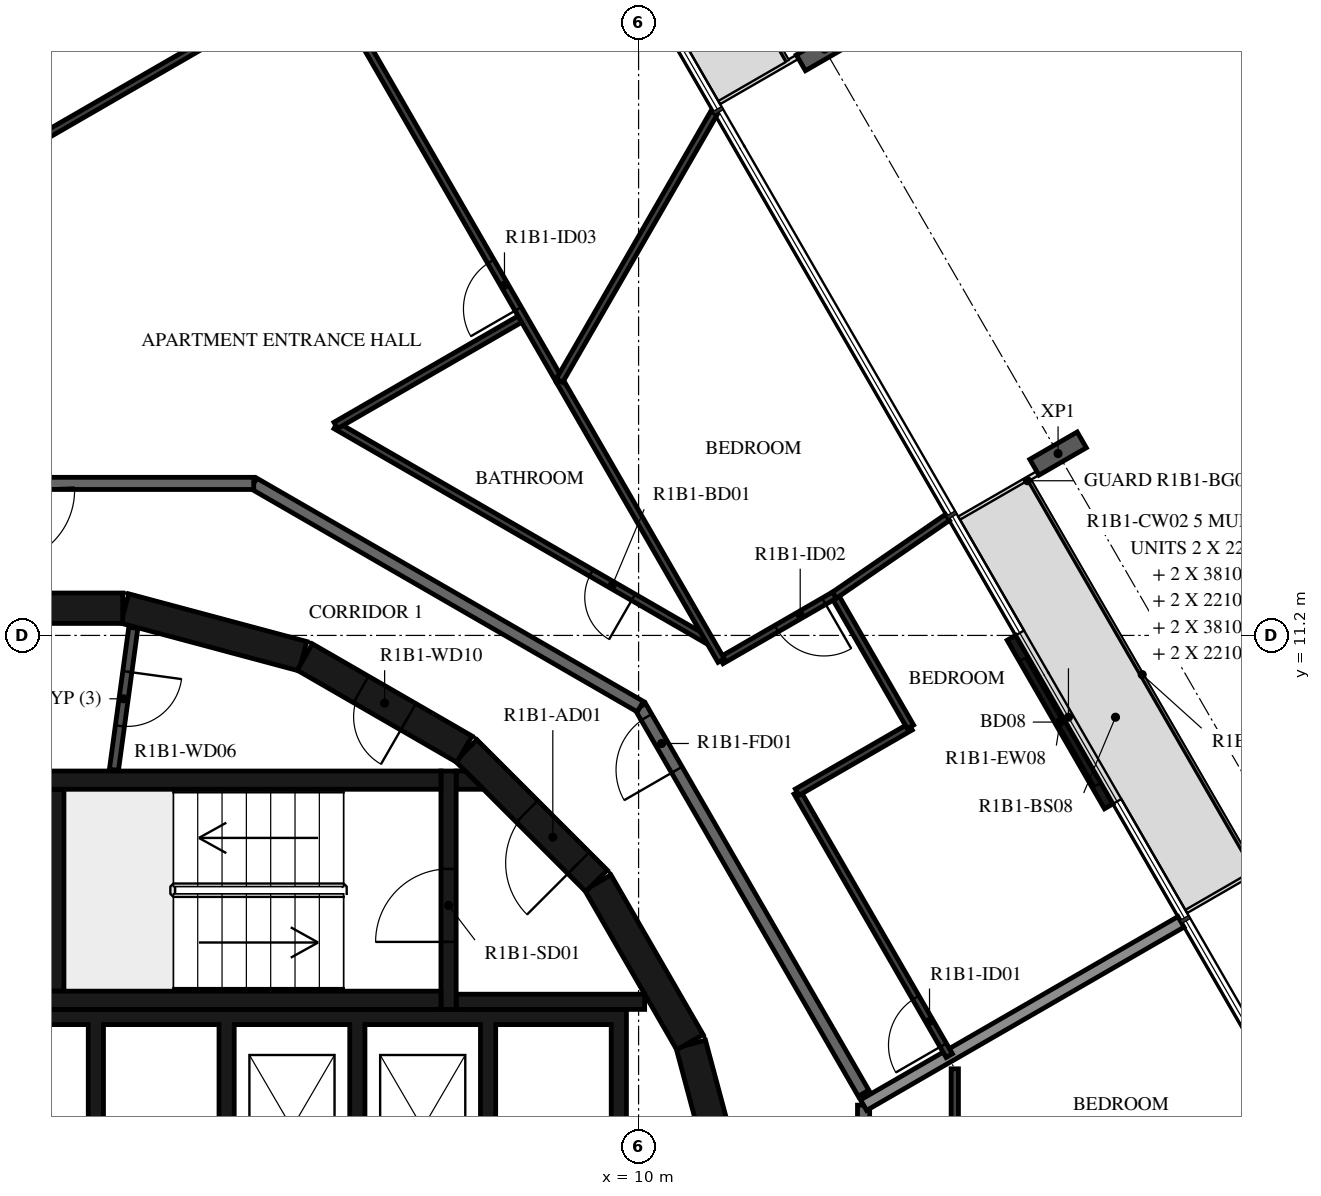
"""IFC4 building model, lengths in metres.
Left out: names, types, materials, properties, quantities, classifications, styles, units other than length and angle.
Written with IfcOpenShell. Run it as: python <this file> out.ifc"""

import sys

from ifc_helpers import new_model, si_unit, direction, frame, frame_2d, origin, origin_2d, place, context, subcontext, project, spatial, polyline, rectangle, i_section, outline, extrude, element, fill, save


model = new_model("IFC4")
c1 = context("Model", 3, precision=1e-05, world=origin(), true_north=direction((0.0, 1.0)))
c2 = subcontext(c1, "Body", "Model", "MODEL_VIEW")
j1 = project(units=[si_unit("LENGTHUNIT", "METRE"), si_unit("PLANEANGLEUNIT", "RADIAN")], contexts=[c1])
p1 = place(None, origin())
s1 = spatial("IfcSite", under=j1, at=p1, CompositionType="ELEMENT")
p2 = place(p1, origin())
s2 = spatial("IfcBuilding", under=s1, at=p2, CompositionType="ELEMENT")
p3 = place(p2, frame((0.0, 0.0, 48.9)))
s3 = spatial("IfcBuildingStorey", under=s2, at=p3, CompositionType="ELEMENT", Elevation=48.9)
for number, where, z_axis, x_axis in (
    (1, (16.899, 14.19, -0.38), (0.0, 0.0, 1.0), (0.5, -0.866, 0.0)),
    (2, (13.059, 20.842, -0.38), (0.0, 0.0, 1.0), (0.5, -0.866, 0.0)),
):
    element("IfcColumn", number, at=place(p3, frame(where, z_axis=z_axis, x_axis=x_axis)), inside=s3, PredefinedType="COLUMN", context=c2, shape_type="SweptSolid", body=[
        extrude(i_section(OverallWidth=0.3, OverallDepth=0.9, WebThickness=0.019, FlangeThickness=0.035, FilletRadius=0.03, at=origin_2d()), origin(), (0.0, 0.0, 1.0), 3.5),
    ])
p4 = place(p3, frame((17.731, 8.389, 0.0), z_axis=(0.0, 0.0, 1.0), x_axis=(-0.500028443584, 0.866008981251, 0.0)))
e3 = element("IfcWall", 3, at=p4, inside=s3, PredefinedType="STANDARD", context=c2, shape_type="SweptSolid", body=[
    extrude(rectangle(XDim=3.2, YDim=0.16, at=frame_2d((1.6, 0.0))), origin(), (0.0, 0.0, 1.0), 3.12),
])
p5 = place(p4, frame((0.4, 0.0, 0.0)))
e4 = element("IfcOpeningElement", 4, at=p5, cuts=e3, PredefinedType="OPENING", context=c2, shape_type="SweptSolid", body=[
    extrude(rectangle(XDim=2.4, YDim=2.4, at=frame_2d((1.2, 1.2))), frame((0.0, 0.09, 0.0), z_axis=(0.0, -1.0, 0.0), x_axis=(1.0, 0.0, 0.0)), (0.0, 0.0, 1.0), 0.18),
])
for number, where, z_axis, x_axis in (
    (5, (11.643, 1.55, 0.0), (0.0, 0.0, 1.0), (-0.259, 0.966, 0.0)),
    (6, (10.845, 4.51, 0.0), (0.0, 0.0, 1.0), (-0.5, 0.866, 0.0)),
):
    element("IfcWall", number, at=place(p3, frame(where, z_axis=z_axis, x_axis=x_axis)), inside=s3, PredefinedType="SHEAR", context=c2, shape_type="SweptSolid", body=[
        extrude(rectangle(XDim=3.033, YDim=0.5, at=frame_2d((1.516, 0.0))), origin(), (0.0, 0.0, 1.0), 3.12),
    ])
p6 = place(p3, frame((9.308, 7.164, 0.0), z_axis=(0.0, 0.0, 1.0), x_axis=(-0.707106781187, 0.707106781187, 0.0)))
e7 = element("IfcWall", 7, at=p6, inside=s3, PredefinedType="SHEAR", context=c2, shape_type="SweptSolid", body=[
    extrude(rectangle(XDim=3.032, YDim=0.5, at=frame_2d((1.516, 0.0))), origin(), (0.0, 0.0, 1.0), 3.12),
])
p7 = place(p6, frame((0.416, 0.0, 0.0)))
e8 = element("IfcOpeningElement", 8, at=p7, cuts=e7, PredefinedType="OPENING", context=c2, shape_type="SweptSolid", body=[
    extrude(rectangle(XDim=1.2, YDim=2.1, at=frame_2d((0.6, 1.05))), frame((0.0, 0.26, 0.0), z_axis=(0.0, -1.0, 0.0), x_axis=(1.0, 0.0, 0.0)), (0.0, 0.0, 1.0), 0.52),
])
p8 = place(p3, frame((7.137, 9.329, 0.0), z_axis=(0.0, 0.0, 1.0), x_axis=(-0.865975092491, 0.500087131594, 0.0)))
e9 = element("IfcWall", 9, at=p8, inside=s3, PredefinedType="SHEAR", context=c2, shape_type="SweptSolid", body=[
    extrude(rectangle(XDim=3.033, YDim=0.5, at=frame_2d((1.516, 0.0))), origin(), (0.0, 0.0, 1.0), 3.12),
])
p9 = place(p8, frame((1.066, 0.0, 0.0)))
e10 = element("IfcOpeningElement", 10, at=p9, cuts=e9, PredefinedType="OPENING", context=c2, shape_type="SweptSolid", body=[
    extrude(rectangle(XDim=0.9, YDim=2.1, at=frame_2d((0.45, 1.05))), frame((0.0, 0.26, 0.0), z_axis=(0.0, -1.0, 0.0), x_axis=(1.0, 0.0, 0.0)), (0.0, 0.0, 1.0), 0.52),
])
for number, where, z_axis, x_axis in (
    (11, (4.479, 10.858, 0.0), (0.0, 0.0, 1.0), (-0.966, 0.259, 0.0)),
    (12, (1.516, 11.647, 0.0), (0.0, 0.0, 1.0), (-1.0, 0.0, 0.0)),
):
    element("IfcWall", number, at=place(p3, frame(where, z_axis=z_axis, x_axis=x_axis)), inside=s3, PredefinedType="SHEAR", context=c2, shape_type="SweptSolid", body=[
        extrude(rectangle(XDim=3.033, YDim=0.5, at=frame_2d((1.516, 0.0))), origin(), (0.0, 0.0, 1.0), 3.12),
    ])
for number, where, z_axis, x_axis in (
    (13, (0.0, 5.2, 0.0), (0.0, 0.0, 1.0), (1.0, 0.0, 0.0)),
    (14, (0.0, 8.82, 0.0), (0.0, 0.0, 1.0), (1.0, 0.0, 0.0)),
):
    element("IfcWall", number, at=place(p3, frame(where, z_axis=z_axis, x_axis=x_axis)), inside=s3, PredefinedType="SHEAR", context=c2, shape_type="SweptSolid", body=[
        extrude(rectangle(XDim=6.75, YDim=0.3, at=frame_2d((3.375, 0.0))), origin(), (0.0, 0.0, 1.0), 3.12),
    ])
p10 = place(p3, frame((0.4, 5.35, 0.0), z_axis=(0.0, 0.0, 1.0), x_axis=(0.0, 1.0, 0.0)))
e15 = element("IfcWall", 15, at=p10, inside=s3, PredefinedType="SHEAR", context=c2, shape_type="SweptSolid", body=[
    extrude(rectangle(XDim=3.32, YDim=0.3, at=frame_2d((1.66, 0.0))), origin(), (0.0, 0.0, 1.0), 3.12),
])
p11 = place(p3, frame((6.875, 5.05, 0.0), z_axis=(0.0, 0.0, 1.0), x_axis=(0.0, 1.0, 0.0)))
e16 = element("IfcWall", 16, at=p11, inside=s3, PredefinedType="SHEAR", context=c2, shape_type="SweptSolid", body=[
    extrude(rectangle(XDim=3.92, YDim=0.25, at=frame_2d((1.96, 0.0))), origin(), (0.0, 0.0, 1.0), 3.12),
])
p12 = place(p11, frame((1.11, 0.0, 0.0)))
e17 = element("IfcOpeningElement", 17, at=p12, cuts=e16, PredefinedType="OPENING", context=c2, shape_type="SweptSolid", body=[
    extrude(rectangle(XDim=1.2, YDim=2.1, at=frame_2d((0.6, 1.05))), frame((0.0, 0.135, 0.0), z_axis=(0.0, -1.0, 0.0), x_axis=(1.0, 0.0, 0.0)), (0.0, 0.0, 1.0), 0.27),
])
p13 = place(p3, frame((7.0, 5.175, 0.0), z_axis=(0.0, 0.0, 1.0), x_axis=(1.0, 0.0, 0.0)))
e18 = element("IfcWall", 18, at=p13, inside=s3, PredefinedType="SHEAR", context=c2, shape_type="SweptSolid", body=[
    extrude(rectangle(XDim=3.1, YDim=0.25, at=frame_2d((1.55, 0.0))), origin(), (0.0, 0.0, 1.0), 3.12),
])
p14 = place(p3, origin())
e19 = element("IfcWall", 19, at=p14, inside=s3, PredefinedType="SHEAR", context=c2, shape_type="SweptSolid", body=[
    extrude(outline(polyline([(7.448, 8.67), (7.0, 8.67), (7.0, 8.97), (7.148, 8.97), (7.448, 8.67)])), origin(), (0.0, 0.0, 1.0), 3.12),
])
p15 = place(p3, origin())
e20 = element("IfcWall", 20, at=p15, inside=s3, PredefinedType="SHEAR", context=c2, shape_type="SweptSolid", body=[
    extrude(outline(polyline([(-9.55, 4.8), (-7.65, 4.8), (-7.65, 1.9), (-7.4, 1.9), (-7.4, 4.8), (-5.5, 4.8), (-5.5, 1.9), (-5.25, 1.9), (-5.25, 4.8), (-3.35, 4.8), (-3.35, 1.9), (-3.1, 1.9), (-3.1, 4.8), (-1.2, 4.8), (-1.2, 1.9), (-0.95, 1.9), (-0.95, 4.8), (0.95, 4.8), (0.95, 1.9), (1.2, 1.9), (1.2, 4.8), (3.1, 4.8), (3.1, 1.9), (3.35, 1.9), (3.35, 4.8), (5.25, 4.8), (5.25, 1.9), (5.5, 1.9), (5.5, 4.8), (7.4, 4.8), (7.4, 1.9), (7.65, 1.9), (7.65, 4.8), (9.55, 4.8), (9.55, 1.9), (9.8, 1.9), (9.8, 4.8), (9.8, 5.05), (-9.8, 5.05), (-9.8, 4.8), (-9.8, 1.9), (-9.55, 1.9), (-9.55, 4.8)])), origin(), (0.0, 0.0, 1.0), 3.12),
])
p16 = place(p3, frame((1.691, 11.326, 0.0), z_axis=(0.0, 0.0, 1.0), x_axis=(-0.135344253201, -0.990798633994, 0.0)))
e21 = element("IfcWall", 21, at=p16, inside=s3, PredefinedType="PARTITIONING", context=c2, shape_type="SweptSolid", body=[
    extrude(rectangle(XDim=2.358, YDim=0.15, at=frame_2d((1.179, 0.0))), origin(), (0.0, 0.0, 1.0), 3.12),
])
p17 = place(p16, frame((0.729, 0.0, 0.0)))
e22 = element("IfcOpeningElement", 22, at=p17, cuts=e21, PredefinedType="OPENING", context=c2, shape_type="SweptSolid", body=[
    extrude(rectangle(XDim=0.9, YDim=2.1, at=frame_2d((0.45, 1.05))), frame((0.0, 0.085, 0.0), z_axis=(0.0, -1.0, 0.0), x_axis=(1.0, 0.0, 0.0)), (0.0, 0.0, 1.0), 0.17),
])
p18 = place(p3, frame((13.7, 3.671, 0.0), z_axis=(0.0, 0.0, 1.0), x_axis=(-0.500001669485, 0.866024439905, 0.0)))
e23 = element("IfcWall", 23, at=p18, inside=s3, PredefinedType="STANDARD", context=c2, shape_type="SweptSolid", body=[
    extrude(rectangle(XDim=7.342, YDim=0.2, at=frame_2d((3.671, 0.0))), origin(), (0.0, 0.0, 1.0), 3.12),
])
p19 = place(p18, frame((6.142, 0.0, 0.0)))
e24 = element("IfcOpeningElement", 24, at=p19, cuts=e23, PredefinedType="OPENING", context=c2, shape_type="SweptSolid", body=[
    extrude(rectangle(XDim=1.0, YDim=2.1, at=frame_2d((0.5, 1.05))), frame((0.0, 0.11, 0.0), z_axis=(0.0, -1.0, 0.0), x_axis=(1.0, 0.0, 0.0)), (0.0, 0.0, 1.0), 0.22),
])
for number, where, z_axis, x_axis in (
    (25, (10.029, 10.029, 0.0), (0.0, 0.0, 1.0), (-0.866, 0.5, 0.0)),
    (26, (3.671, 13.7, 0.0), (0.0, 0.0, 1.0), (-1.0, 0.0, 0.0)),
):
    element("IfcWall", number, at=place(p3, frame(where, z_axis=z_axis, x_axis=x_axis)), inside=s3, PredefinedType="STANDARD", context=c2, shape_type="SweptSolid", body=[
        extrude(rectangle(XDim=7.342, YDim=0.2, at=frame_2d((3.671, 0.0))), origin(), (0.0, 0.0, 1.0), 3.12),
    ])
p20 = place(p3, frame((13.7, -3.671, 0.0), z_axis=(0.0, 0.0, 1.0), x_axis=(0.0, 1.0, 0.0)))
e27 = element("IfcWall", 27, at=p20, inside=s3, PredefinedType="STANDARD", context=c2, shape_type="SweptSolid", body=[
    extrude(rectangle(XDim=7.146, YDim=0.2, at=frame_2d((3.573, 0.0))), origin(), (0.0, 0.0, 1.0), 3.12),
])
p21 = place(p20, frame((5.947, 0.0, 0.0)))
e28 = element("IfcOpeningElement", 28, at=p21, cuts=e27, PredefinedType="OPENING", context=c2, shape_type="SweptSolid", body=[
    extrude(rectangle(XDim=1.0, YDim=2.1, at=frame_2d((0.5, 1.05))), frame((0.0, 0.11, 0.0), z_axis=(0.0, -1.0, 0.0), x_axis=(1.0, 0.0, 0.0)), (0.0, 0.0, 1.0), 0.22),
])
p22 = place(p3, frame((13.7, 3.476, 0.0), z_axis=(0.0, 0.0, 1.0), x_axis=(0.866013584312, 0.500020471368, 0.0)))
e29 = element("IfcWall", 29, at=p22, inside=s3, PredefinedType="STANDARD", context=c2, shape_type="SweptSolid", body=[
    extrude(rectangle(XDim=6.028, YDim=0.2, at=frame_2d((3.014, 0.0))), origin(), (0.0, 0.0, 1.0), 2.73),
])
p23 = place(p3, frame((15.11, 4.289, 0.0), z_axis=(0.0, 0.0, 1.0), x_axis=(-0.500033654285, 0.866005972602, 0.0)))
e30 = element("IfcWall", 30, at=p23, inside=s3, PredefinedType="PARTITIONING", context=c2, shape_type="SweptSolid", body=[
    extrude(rectangle(XDim=5.003, YDim=0.12, at=frame_2d((2.501, 0.0))), origin(), (0.0, 0.0, 1.0), 3.12),
])
p24 = place(p23, frame((0.2, 0.0, 0.0)))
e31 = element("IfcOpeningElement", 31, at=p24, cuts=e30, PredefinedType="OPENING", context=c2, shape_type="SweptSolid", body=[
    extrude(rectangle(XDim=0.9, YDim=2.1, at=frame_2d((0.45, 1.05))), frame((0.0, 0.07, 0.0), z_axis=(0.0, -1.0, 0.0), x_axis=(1.0, 0.0, 0.0)), (0.0, 0.0, 1.0), 0.14),
])
p25 = place(p3, frame((12.608, 8.622, 0.0), z_axis=(0.0, 0.0, 1.0), x_axis=(0.866005997533, 0.500033611107, 0.0)))
e32 = element("IfcWall", 32, at=p25, inside=s3, PredefinedType="PARTITIONING", context=c2, shape_type="SweptSolid", body=[
    extrude(rectangle(XDim=2.151, YDim=0.12, at=frame_2d((1.075, 0.0))), origin(), (0.0, 0.0, 1.0), 3.12),
])
p26 = place(p3, frame((14.471, 9.697, 0.0), z_axis=(0.0, 0.0, 1.0), x_axis=(-0.500004234368, 0.866022959057, 0.0)))
e33 = element("IfcWall", 33, at=p26, inside=s3, PredefinedType="PARTITIONING", context=c2, shape_type="SweptSolid", body=[
    extrude(rectangle(XDim=2.5, YDim=0.12, at=frame_2d((1.25, 0.0))), origin(), (0.0, 0.0, 1.0), 3.12),
])
p27 = place(p3, frame((13.221, 11.862, 0.0), z_axis=(0.0, 0.0, 1.0), x_axis=(-0.866055151781, -0.499948471418, 0.0)))
e34 = element("IfcWall", 34, at=p27, inside=s3, PredefinedType="PARTITIONING", context=c2, shape_type="SweptSolid", body=[
    extrude(rectangle(XDim=2.151, YDim=0.12, at=frame_2d((1.075, 0.0))), origin(), (0.0, 0.0, 1.0), 3.12),
])
p28 = place(p27, frame((0.2, 0.0, 0.0)))
e35 = element("IfcOpeningElement", 35, at=p28, cuts=e34, PredefinedType="OPENING", context=c2, shape_type="SweptSolid", body=[
    extrude(rectangle(XDim=0.9, YDim=2.1, at=frame_2d((0.45, 1.05))), frame((0.0, 0.07, 0.0), z_axis=(0.0, -1.0, 0.0), x_axis=(1.0, 0.0, 0.0)), (0.0, 0.0, 1.0), 0.14),
])
p29 = place(p3, frame((11.127, 11.127, 0.0), z_axis=(0.0, 0.0, 1.0), x_axis=(-0.86602299963, 0.500004164094, 0.0)))
e36 = element("IfcWall", 36, at=p29, inside=s3, PredefinedType="PARTITIONING", context=c2, shape_type="SweptSolid", body=[
    extrude(rectangle(XDim=7.052, YDim=0.12, at=frame_2d((3.526, 0.0))), origin(), (0.0, 0.0, 1.0), 3.12),
])
p30 = place(p29, frame((1.4, 0.0, 0.0)))
e37 = element("IfcOpeningElement", 37, at=p30, cuts=e36, PredefinedType="OPENING", context=c2, shape_type="SweptSolid", body=[
    extrude(rectangle(XDim=0.8, YDim=2.1, at=frame_2d((0.4, 1.05))), frame((0.0, 0.07, 0.0), z_axis=(0.0, -1.0, 0.0), x_axis=(1.0, 0.0, 0.0)), (0.0, 0.0, 1.0), 0.14),
])
p31 = place(p3, frame((5.02, 14.653, 0.0), z_axis=(0.0, 0.0, 1.0), x_axis=(0.866028940167, 0.499993874756, 0.0)))
e38 = element("IfcWall", 38, at=p31, inside=s3, PredefinedType="PARTITIONING", context=c2, shape_type="SweptSolid", body=[
    extrude(rectangle(XDim=3.556, YDim=0.12, at=frame_2d((1.778, 0.0))), origin(), (0.0, 0.0, 1.0), 3.12),
])
p32 = place(p3, frame((8.7, 15.392, 0.0), z_axis=(0.0, 0.0, 1.0), x_axis=(-0.500002742713, 0.866023820272, 0.0)))
e39 = element("IfcWall", 39, at=p32, inside=s3, PredefinedType="PARTITIONING", context=c2, shape_type="SweptSolid", body=[
    extrude(rectangle(XDim=10.908, YDim=0.12, at=frame_2d((5.454, 0.0))), origin(), (0.0, 0.0, 1.0), 3.12),
])
p33 = place(p32, frame((1.36, 0.0, 0.0)))
e40 = element("IfcOpeningElement", 40, at=p33, cuts=e39, PredefinedType="OPENING", context=c2, shape_type="SweptSolid", body=[
    extrude(rectangle(XDim=0.9, YDim=2.1, at=frame_2d((0.45, 1.05))), frame((0.0, 0.07, 0.0), z_axis=(0.0, -1.0, 0.0), x_axis=(1.0, 0.0, 0.0)), (0.0, 0.0, 1.0), 0.14),
])
p34 = place(p32, frame((8.317, 0.0, 0.0)))
e41 = element("IfcOpeningElement", 41, at=p34, cuts=e39, PredefinedType="OPENING", context=c2, shape_type="SweptSolid", body=[
    extrude(rectangle(XDim=0.9, YDim=2.1, at=frame_2d((0.45, 1.05))), frame((0.0, 0.07, 0.0), z_axis=(0.0, -1.0, 0.0), x_axis=(1.0, 0.0, 0.0)), (0.0, 0.0, 1.0), 0.14),
])
p35 = place(p3, frame((4.841, 22.075, 0.0), z_axis=(0.0, 0.0, 1.0), x_axis=(-0.866019751484, -0.500009789943, 0.0)))
e42 = element("IfcWall", 42, at=p35, inside=s3, PredefinedType="PARTITIONING", context=c2, shape_type="SweptSolid", body=[
    extrude(rectangle(XDim=5.59, YDim=0.12, at=frame_2d((2.795, 0.0))), origin(), (0.0, 0.0, 1.0), 3.12),
])
p36 = place(p35, frame((0.2, 0.0, 0.0)))
e43 = element("IfcOpeningElement", 43, at=p36, cuts=e42, PredefinedType="OPENING", context=c2, shape_type="SweptSolid", body=[
    extrude(rectangle(XDim=0.9, YDim=2.1, at=frame_2d((0.45, 1.05))), frame((0.0, 0.07, 0.0), z_axis=(0.0, -1.0, 0.0), x_axis=(1.0, 0.0, 0.0)), (0.0, 0.0, 1.0), 0.14),
])
p37 = place(p3, frame((15.08, 13.14, 0.0), z_axis=(0.0, 0.0, 1.0), x_axis=(-0.824041924199, -0.566528822887, 0.0)))
e44 = element("IfcWall", 44, at=p37, inside=s3, PredefinedType="PARTITIONING", context=c2, shape_type="SweptSolid", body=[
    extrude(rectangle(XDim=2.256, YDim=0.12, at=frame_2d((1.128, 0.0))), origin(), (0.0, 0.0, 1.0), 2.73),
])
p38 = place(p3, frame((8.7, 15.392, 0.0), z_axis=(0.0, 0.0, 1.0), x_axis=(0.499986106925, -0.866033424806, 0.0)))
e45 = element("IfcWall", 45, at=p38, inside=s3, PredefinedType="PARTITIONING", context=c2, shape_type="SweptSolid", body=[
    extrude(rectangle(XDim=5.317, YDim=0.12, at=frame_2d((2.659, 0.0))), origin(), (0.0, 0.0, 1.0), 3.12),
])
p39 = place(p3, frame((11.24, 19.792, 0.0), z_axis=(0.0, 0.0, 1.0), x_axis=(-0.499978956711, -0.866037552792, 0.0)))
e46 = element("IfcWall", 46, at=p39, inside=s3, PredefinedType="PARTITIONING", context=c2, shape_type="SweptSolid", body=[
    extrude(rectangle(XDim=5.081, YDim=0.12, at=frame_2d((2.541, 0.0))), origin(), (0.0, 0.0, 1.0), 3.12),
])
p40 = place(p3, frame((15.2, 2.862, 0.0), z_axis=(0.0, 0.0, 1.0), x_axis=(0.0, 1.0, 0.0)))
e47 = element("IfcWall", 47, at=p40, inside=s3, PredefinedType="PARTITIONING", context=c2, shape_type="SweptSolid", body=[
    extrude(rectangle(XDim=1.211, YDim=0.12, at=frame_2d((0.605, 0.0))), origin(), (0.0, 0.0, 1.0), 3.12),
])
p41 = place(p5, origin())
e48 = element("IfcDoor", 48, at=p41, inside=s3, OperationType="DOUBLE_DOOR_SLIDING", PredefinedType="DOOR", context=c2, shape_type="SweptSolid", body=[
    extrude(rectangle(XDim=2.4, YDim=2.4, at=frame_2d((1.2, 1.2))), frame((0.0, 0.025, 0.0), z_axis=(0.0, -1.0, 0.0), x_axis=(1.0, 0.0, 0.0)), (0.0, 0.0, 1.0), 0.05),
])
fill(e4, e48)
p42 = place(p12, origin())
e49 = element("IfcDoor", 49, at=p42, inside=s3, OperationType="SINGLE_SWING_LEFT", PredefinedType="DOOR", context=c2, shape_type="SweptSolid", body=[
    extrude(rectangle(XDim=1.2, YDim=2.1, at=frame_2d((0.6, 1.05))), frame((0.0, 0.025, 0.0), z_axis=(0.0, -1.0, 0.0), x_axis=(1.0, 0.0, 0.0)), (0.0, 0.0, 1.0), 0.05),
])
fill(e17, e49)
p43 = place(p7, origin())
e50 = element("IfcDoor", 50, at=p43, inside=s3, OperationType="SINGLE_SWING_RIGHT", PredefinedType="DOOR", context=c2, shape_type="SweptSolid", body=[
    extrude(rectangle(XDim=1.2, YDim=2.1, at=frame_2d((0.6, 1.05))), frame((0.0, 0.025, 0.0), z_axis=(0.0, -1.0, 0.0), x_axis=(1.0, 0.0, 0.0)), (0.0, 0.0, 1.0), 0.05),
])
fill(e8, e50)
p44 = place(p17, origin())
e51 = element("IfcDoor", 51, at=p44, inside=s3, OperationType="SINGLE_SWING_LEFT", PredefinedType="DOOR", context=c2, shape_type="SweptSolid", body=[
    extrude(rectangle(XDim=0.9, YDim=2.1, at=frame_2d((0.45, 1.05))), frame((0.0, 0.025, 0.0), z_axis=(0.0, -1.0, 0.0), x_axis=(1.0, 0.0, 0.0)), (0.0, 0.0, 1.0), 0.05),
])
fill(e22, e51)
p45 = place(p9, origin())
e52 = element("IfcDoor", 52, at=p45, inside=s3, OperationType="SINGLE_SWING_LEFT", PredefinedType="DOOR", context=c2, shape_type="SweptSolid", body=[
    extrude(rectangle(XDim=0.9, YDim=2.1, at=frame_2d((0.45, 1.05))), frame((0.0, 0.025, 0.0), z_axis=(0.0, -1.0, 0.0), x_axis=(1.0, 0.0, 0.0)), (0.0, 0.0, 1.0), 0.05),
])
fill(e10, e52)
p46 = place(p19, origin())
e53 = element("IfcDoor", 53, at=p46, inside=s3, OperationType="SINGLE_SWING_RIGHT", PredefinedType="DOOR", context=c2, shape_type="SweptSolid", body=[
    extrude(rectangle(XDim=1.0, YDim=2.1, at=frame_2d((0.5, 1.05))), frame((0.0, 0.025, 0.0), z_axis=(0.0, -1.0, 0.0), x_axis=(1.0, 0.0, 0.0)), (0.0, 0.0, 1.0), 0.05),
])
fill(e24, e53)
p47 = place(p24, origin())
e54 = element("IfcDoor", 54, at=p47, inside=s3, OperationType="SINGLE_SWING_LEFT", PredefinedType="DOOR", context=c2, shape_type="SweptSolid", body=[
    extrude(rectangle(XDim=0.9, YDim=2.1, at=frame_2d((0.45, 1.05))), frame((0.0, 0.025, 0.0), z_axis=(0.0, -1.0, 0.0), x_axis=(1.0, 0.0, 0.0)), (0.0, 0.0, 1.0), 0.05),
])
fill(e31, e54)
p48 = place(p28, origin())
e55 = element("IfcDoor", 55, at=p48, inside=s3, OperationType="SINGLE_SWING_RIGHT", PredefinedType="DOOR", context=c2, shape_type="SweptSolid", body=[
    extrude(rectangle(XDim=0.9, YDim=2.1, at=frame_2d((0.45, 1.05))), frame((0.0, 0.025, 0.0), z_axis=(0.0, -1.0, 0.0), x_axis=(1.0, 0.0, 0.0)), (0.0, 0.0, 1.0), 0.05),
])
fill(e35, e55)
p49 = place(p30, origin())
e56 = element("IfcDoor", 56, at=p49, inside=s3, OperationType="SINGLE_SWING_RIGHT", PredefinedType="DOOR", context=c2, shape_type="SweptSolid", body=[
    extrude(rectangle(XDim=0.8, YDim=2.1, at=frame_2d((0.4, 1.05))), frame((0.0, 0.025, 0.0), z_axis=(0.0, -1.0, 0.0), x_axis=(1.0, 0.0, 0.0)), (0.0, 0.0, 1.0), 0.05),
])
fill(e37, e56)
p50 = place(p33, origin())
e57 = element("IfcDoor", 57, at=p50, inside=s3, OperationType="SINGLE_SWING_RIGHT", PredefinedType="DOOR", context=c2, shape_type="SweptSolid", body=[
    extrude(rectangle(XDim=0.9, YDim=2.1, at=frame_2d((0.45, 1.05))), frame((0.0, 0.025, 0.0), z_axis=(0.0, -1.0, 0.0), x_axis=(1.0, 0.0, 0.0)), (0.0, 0.0, 1.0), 0.05),
])
fill(e40, e57)
save(model, sys.argv[1])
